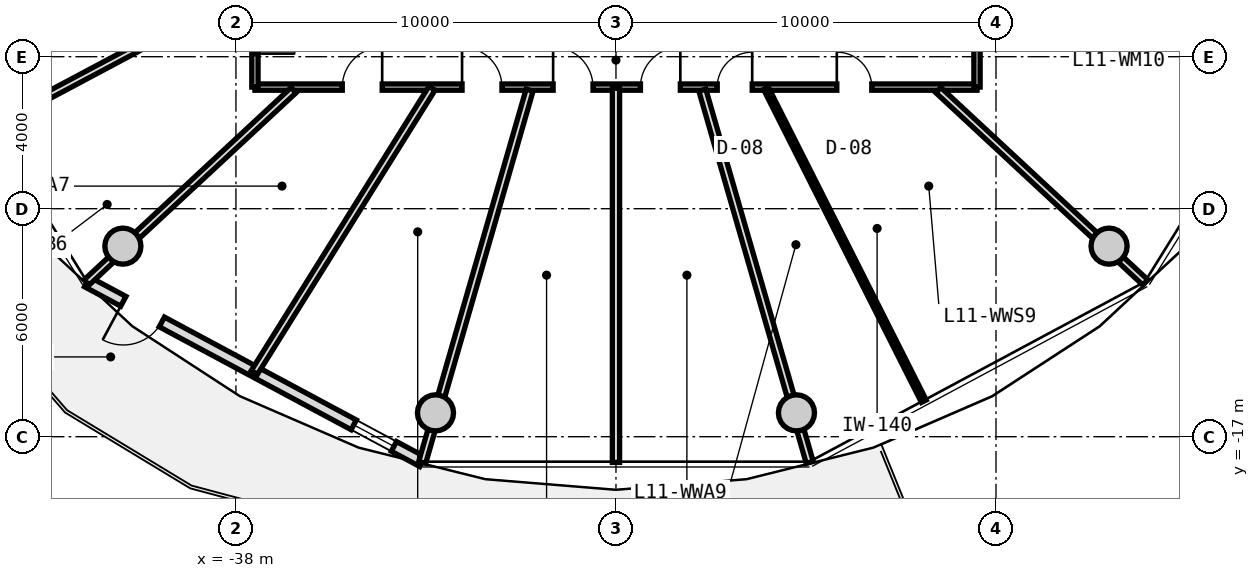
"""IFC4 building model, lengths in metres.
Left out: names, types, materials, properties, quantities, classifications, styles, units other than length and angle.
Written with IfcOpenShell. Run it as: python <this file> out.ifc"""

import sys

from ifc_helpers import new_model, si_unit, direction, frame, frame_2d, origin, origin_2d, place, context, subcontext, project, spatial, rectangle, circle, extrude, source, transform, mapped, element, fill, save


model = new_model("IFC4")
c1 = context("Model", 3, precision=1e-05, world=origin(), true_north=direction((0.0, 1.0)))
c2 = subcontext(c1, "Body", "Model", "MODEL_VIEW")
j1 = project(units=[si_unit("LENGTHUNIT", "METRE"), si_unit("PLANEANGLEUNIT", "RADIAN")], contexts=[c1])
p1 = place(None, origin())
s1 = spatial("IfcSite", under=j1, at=p1, CompositionType="ELEMENT")
p2 = place(p1, origin())
s2 = spatial("IfcBuilding", under=s1, at=p2, CompositionType="ELEMENT")
p3 = place(p2, frame((0.0, 0.0, 39.9)))
s3 = spatial("IfcBuildingStorey", under=s2, at=p3, CompositionType="ELEMENT", Elevation=39.9)
m1 = source(origin(), c2, "Body", "SweptSolid", [
    extrude(circle(Radius=0.475, at=origin_2d()), origin(), (0.0, 0.0, 1.0), 3.05),
])
for number, where, z_axis, x_axis in (
    (1, (-40.975, -11.985, 0.0), (0.0, 0.0, 1.0), (1.0, 0.0, 0.0)),
    (2, (-32.749, -16.373, 0.0), (0.0, 0.0, 1.0), (1.0, 0.0, 0.0)),
    (3, (-23.251, -16.373, 0.0), (0.0, 0.0, 1.0), (1.0, 0.0, 0.0)),
    (4, (-15.025, -11.985, 0.0), (0.0, 0.0, 1.0), (1.0, 0.0, 0.0)),
):
    element("IfcColumn", number, at=place(p3, frame(where, z_axis=z_axis, x_axis=x_axis)), inside=s3, PredefinedType="COLUMN", context=c2, shape_type="MappedRepresentation", body=[
        mapped(m1, transform((0.0, 0.0, 0.0), x_axis=(1.0, 0.0, 0.0), y_axis=(0.0, 1.0, 0.0), z_axis=(0.0, 0.0, 1.0), scale=1.0)),
    ])
m2 = source(origin(), c2, "Body", "SweptSolid", [
    extrude(rectangle(XDim=10.011, YDim=0.29, at=frame_2d((5.005, 0.0))), origin(), (0.0, 0.0, 1.0), 2.79),
])
p4 = place(p3, frame((-33.094, -17.657, 0.0), z_axis=(0.0, 0.0, 1.0), x_axis=(-0.881272505317, 0.472608475773, 0.0)))
e5 = element("IfcWall", 5, at=p4, inside=s3, PredefinedType="SOLIDWALL", context=c2, shape_type="MappedRepresentation", body=[
    mapped(m2, transform((0.0, 0.0, 0.0), x_axis=(1.0, 0.0, 0.0), y_axis=(0.0, 1.0, 0.0), z_axis=(0.0, 0.0, 1.0), scale=1.0)),
])
p5 = place(p4, frame((7.78, 0.0, 0.0)))
e6 = element("IfcOpeningElement", 6, at=p5, cuts=e5, PredefinedType="OPENING", context=c2, shape_type="SweptSolid", body=[
    extrude(rectangle(XDim=1.15, YDim=2.25, at=frame_2d((0.575, 1.125))), frame((0.0, 0.155, 0.0), z_axis=(0.0, -1.0, 0.0), x_axis=(1.0, 0.0, 0.0)), (0.0, 0.0, 1.0), 0.31),
])
p6 = place(p4, frame((0.85, 0.0, 0.85)))
e7 = element("IfcOpeningElement", 7, at=p6, cuts=e5, PredefinedType="OPENING", context=c2, shape_type="SweptSolid", body=[
    extrude(rectangle(XDim=1.2, YDim=1.5, at=frame_2d((0.6, 0.75))), frame((0.0, 0.155, 0.0), z_axis=(0.0, -1.0, 0.0), x_axis=(1.0, 0.0, 0.0)), (0.0, 0.0, 1.0), 0.31),
])
m3 = source(origin(), c2, "Body", "SweptSolid", [
    extrude(rectangle(XDim=19.0, YDim=0.165, at=frame_2d((9.5, 0.0))), origin(), (0.0, 0.0, 1.0), 2.775),
])
p7 = place(p3, frame((-18.5, -7.8, 0.0), z_axis=(0.0, 0.0, 1.0), x_axis=(-1.0, 0.0, 0.0)))
e8 = element("IfcWall", 8, at=p7, inside=s3, PredefinedType="PARTITIONING", context=c2, shape_type="MappedRepresentation", body=[
    mapped(m3, transform((0.0, 0.0, 0.0), x_axis=(1.0, 0.0, 0.0), y_axis=(0.0, 1.0, 0.0), z_axis=(0.0, 0.0, 1.0), scale=1.0)),
])
p8 = place(p7, frame((15.652, 0.0, 0.0)))
e9 = element("IfcOpeningElement", 9, at=p8, cuts=e8, PredefinedType="OPENING", context=c2, shape_type="SweptSolid", body=[
    extrude(rectangle(XDim=1.05, YDim=2.15, at=frame_2d((0.525, 1.075))), frame((0.0, 0.093, 0.0), z_axis=(0.0, -1.0, 0.0), x_axis=(1.0, 0.0, 0.0)), (0.0, 0.0, 1.0), 0.185),
])
p9 = place(p7, frame((12.5, 0.0, 0.0)))
e10 = element("IfcOpeningElement", 10, at=p9, cuts=e8, PredefinedType="OPENING", context=c2, shape_type="SweptSolid", body=[
    extrude(rectangle(XDim=1.05, YDim=2.15, at=frame_2d((0.525, 1.075))), frame((0.0, 0.093, 0.0), z_axis=(0.0, -1.0, 0.0), x_axis=(1.0, 0.0, 0.0)), (0.0, 0.0, 1.0), 0.185),
])
p10 = place(p7, frame((10.104, 0.0, 0.0)))
e11 = element("IfcOpeningElement", 11, at=p10, cuts=e8, PredefinedType="OPENING", context=c2, shape_type="SweptSolid", body=[
    extrude(rectangle(XDim=1.05, YDim=2.15, at=frame_2d((0.525, 1.075))), frame((0.0, 0.093, 0.0), z_axis=(0.0, -1.0, 0.0), x_axis=(1.0, 0.0, 0.0)), (0.0, 0.0, 1.0), 0.185),
])
p11 = place(p7, frame((7.806, 0.0, 0.0)))
e12 = element("IfcOpeningElement", 12, at=p11, cuts=e8, PredefinedType="OPENING", context=c2, shape_type="SweptSolid", body=[
    extrude(rectangle(XDim=1.05, YDim=2.15, at=frame_2d((0.525, 1.075))), frame((0.0, 0.093, 0.0), z_axis=(0.0, -1.0, 0.0), x_axis=(1.0, 0.0, 0.0)), (0.0, 0.0, 1.0), 0.185),
])
p12 = place(p7, frame((5.915, 0.0, 0.0)))
e13 = element("IfcOpeningElement", 13, at=p12, cuts=e8, PredefinedType="OPENING", context=c2, shape_type="SweptSolid", body=[
    extrude(rectangle(XDim=0.92, YDim=2.1, at=frame_2d((0.46, 1.05))), frame((0.0, 0.093, 0.0), z_axis=(0.0, -1.0, 0.0), x_axis=(1.0, 0.0, 0.0)), (0.0, 0.0, 1.0), 0.185),
])
p13 = place(p7, frame((2.769, 0.0, 0.0)))
e14 = element("IfcOpeningElement", 14, at=p13, cuts=e8, PredefinedType="OPENING", context=c2, shape_type="SweptSolid", body=[
    extrude(rectangle(XDim=0.92, YDim=2.1, at=frame_2d((0.46, 1.05))), frame((0.0, 0.093, 0.0), z_axis=(0.0, -1.0, 0.0), x_axis=(1.0, 0.0, 0.0)), (0.0, 0.0, 1.0), 0.185),
])
m4 = source(origin(), c2, "Body", "SweptSolid", [
    extrude(rectangle(XDim=15.6, YDim=0.165, at=frame_2d((7.8, 0.0))), origin(), (0.0, 0.0, 1.0), 2.775),
])
p14 = place(p3, frame((-37.5, -7.8, 0.0), z_axis=(0.0, 0.0, 1.0), x_axis=(0.0, 1.0, 0.0)))
e15 = element("IfcWall", 15, at=p14, inside=s3, PredefinedType="PARTITIONING", context=c2, shape_type="MappedRepresentation", body=[
    mapped(m4, transform((0.0, 0.0, 0.0), x_axis=(1.0, 0.0, 0.0), y_axis=(0.0, 1.0, 0.0), z_axis=(0.0, 0.0, 1.0), scale=1.0)),
])
p15 = place(p14, frame((13.293, 0.0, 0.0)))
e16 = element("IfcOpeningElement", 16, at=p15, cuts=e15, PredefinedType="OPENING", context=c2, shape_type="SweptSolid", body=[
    extrude(rectangle(XDim=1.05, YDim=2.15, at=frame_2d((0.525, 1.075))), frame((0.0, 0.093, 0.0), z_axis=(0.0, -1.0, 0.0), x_axis=(1.0, 0.0, 0.0)), (0.0, 0.0, 1.0), 0.185),
])
p16 = place(p14, frame((11.018, 0.0, 0.0)))
e17 = element("IfcOpeningElement", 17, at=p16, cuts=e15, PredefinedType="OPENING", context=c2, shape_type="SweptSolid", body=[
    extrude(rectangle(XDim=1.05, YDim=2.15, at=frame_2d((0.525, 1.075))), frame((0.0, 0.093, 0.0), z_axis=(0.0, -1.0, 0.0), x_axis=(1.0, 0.0, 0.0)), (0.0, 0.0, 1.0), 0.185),
])
p17 = place(p14, frame((7.812, 0.0, 0.0)))
e18 = element("IfcOpeningElement", 18, at=p17, cuts=e15, PredefinedType="OPENING", context=c2, shape_type="SweptSolid", body=[
    extrude(rectangle(XDim=1.05, YDim=2.15, at=frame_2d((0.525, 1.075))), frame((0.0, 0.093, 0.0), z_axis=(0.0, -1.0, 0.0), x_axis=(1.0, 0.0, 0.0)), (0.0, 0.0, 1.0), 0.185),
])
p18 = place(p14, frame((6.035, 0.0, 0.0)))
e19 = element("IfcOpeningElement", 19, at=p18, cuts=e15, PredefinedType="OPENING", context=c2, shape_type="SweptSolid", body=[
    extrude(rectangle(XDim=1.05, YDim=2.15, at=frame_2d((0.525, 1.075))), frame((0.0, 0.093, 0.0), z_axis=(0.0, -1.0, 0.0), x_axis=(1.0, 0.0, 0.0)), (0.0, 0.0, 1.0), 0.185),
])
p19 = place(p14, frame((3.489, 0.0, 0.0)))
e20 = element("IfcOpeningElement", 20, at=p19, cuts=e15, PredefinedType="OPENING", context=c2, shape_type="SweptSolid", body=[
    extrude(rectangle(XDim=1.05, YDim=2.15, at=frame_2d((0.525, 1.075))), frame((0.0, 0.093, 0.0), z_axis=(0.0, -1.0, 0.0), x_axis=(1.0, 0.0, 0.0)), (0.0, 0.0, 1.0), 0.185),
])
p20 = place(p14, frame((0.882, 0.0, 0.0)))
e21 = element("IfcOpeningElement", 21, at=p20, cuts=e15, PredefinedType="OPENING", context=c2, shape_type="SweptSolid", body=[
    extrude(rectangle(XDim=1.05, YDim=2.15, at=frame_2d((0.525, 1.075))), frame((0.0, 0.093, 0.0), z_axis=(0.0, -1.0, 0.0), x_axis=(1.0, 0.0, 0.0)), (0.0, 0.0, 1.0), 0.185),
])
p21 = place(p3, frame((-18.5, 7.8, 0.0), z_axis=(0.0, 0.0, 1.0), x_axis=(0.0, -1.0, 0.0)))
e22 = element("IfcWall", 22, at=p21, inside=s3, PredefinedType="PARTITIONING", context=c2, shape_type="MappedRepresentation", body=[
    mapped(m4, transform((0.0, 0.0, 0.0), x_axis=(1.0, 0.0, 0.0), y_axis=(0.0, 1.0, 0.0), z_axis=(0.0, 0.0, 1.0), scale=1.0)),
])
p22 = place(p21, frame((12.141, 0.0, 0.0)))
e23 = element("IfcOpeningElement", 23, at=p22, cuts=e22, PredefinedType="OPENING", context=c2, shape_type="SweptSolid", body=[
    extrude(rectangle(XDim=1.25, YDim=2.2, at=frame_2d((0.625, 1.1))), frame((0.0, 0.093, 0.0), z_axis=(0.0, -1.0, 0.0), x_axis=(1.0, 0.0, 0.0)), (0.0, 0.0, 1.0), 0.185),
])
p23 = place(p21, frame((7.175, 0.0, 0.0)))
e24 = element("IfcOpeningElement", 24, at=p23, cuts=e22, PredefinedType="OPENING", context=c2, shape_type="SweptSolid", body=[
    extrude(rectangle(XDim=1.25, YDim=2.2, at=frame_2d((0.625, 1.1))), frame((0.0, 0.093, 0.0), z_axis=(0.0, -1.0, 0.0), x_axis=(1.0, 0.0, 0.0)), (0.0, 0.0, 1.0), 0.185),
])
p24 = place(p21, frame((2.826, 0.0, 0.0)))
e25 = element("IfcOpeningElement", 25, at=p24, cuts=e22, PredefinedType="OPENING", context=c2, shape_type="SweptSolid", body=[
    extrude(rectangle(XDim=1.05, YDim=2.15, at=frame_2d((0.525, 1.075))), frame((0.0, 0.093, 0.0), z_axis=(0.0, -1.0, 0.0), x_axis=(1.0, 0.0, 0.0)), (0.0, 0.0, 1.0), 0.185),
])
p25 = place(p21, frame((0.881, 0.0, 0.0)))
e26 = element("IfcOpeningElement", 26, at=p25, cuts=e22, PredefinedType="OPENING", context=c2, shape_type="SweptSolid", body=[
    extrude(rectangle(XDim=1.05, YDim=2.15, at=frame_2d((0.525, 1.075))), frame((0.0, 0.093, 0.0), z_axis=(0.0, -1.0, 0.0), x_axis=(1.0, 0.0, 0.0)), (0.0, 0.0, 1.0), 0.185),
])
m5 = source(origin(), c2, "Body", "SweptSolid", [
    extrude(rectangle(XDim=7.435, YDim=0.19, at=frame_2d((3.717, 0.0))), origin(), (0.0, 0.0, 1.0), 2.225),
])
p26 = place(p3, frame((-36.483, -7.88, 0.0), z_axis=(0.0, 0.0, 1.0), x_axis=(-0.732651956848, -0.680603489652, 0.0)))
e27 = element("IfcWall", 27, at=p26, inside=s3, PredefinedType="PARTITIONING", context=c2, shape_type="MappedRepresentation", body=[
    mapped(m5, transform((0.0, 0.0, 0.0), x_axis=(1.0, 0.0, 0.0), y_axis=(0.0, 1.0, 0.0), z_axis=(0.0, 0.0, 1.0), scale=1.0)),
])
m6 = source(origin(), c2, "Body", "SweptSolid", [
    extrude(rectangle(XDim=7.873, YDim=0.19, at=frame_2d((3.937, 0.0))), origin(), (0.0, 0.0, 1.0), 2.775),
])
p27 = place(p3, frame((-37.53, -5.138, 0.0), z_axis=(0.0, 0.0, 1.0), x_axis=(-0.882666052726, -0.470000680175, 0.0)))
e28 = element("IfcWall", 28, at=p27, inside=s3, PredefinedType="PARTITIONING", context=c2, shape_type="MappedRepresentation", body=[
    mapped(m6, transform((0.0, 0.0, 0.0), x_axis=(1.0, 0.0, 0.0), y_axis=(0.0, 1.0, 0.0), z_axis=(0.0, 0.0, 1.0), scale=1.0)),
])
m7 = source(origin(), c2, "Body", "SweptSolid", [
    extrude(rectangle(XDim=10.196, YDim=0.19, at=frame_2d((5.098, 0.0))), origin(), (0.0, 0.0, 1.0), 2.225),
])
p28 = place(p3, frame((-30.273, -7.88, 0.0), z_axis=(0.0, 0.0, 1.0), x_axis=(-0.277136420347, -0.960830580549, 0.0)))
e29 = element("IfcWall", 29, at=p28, inside=s3, PredefinedType="PARTITIONING", context=c2, shape_type="MappedRepresentation", body=[
    mapped(m7, transform((0.0, 0.0, 0.0), x_axis=(1.0, 0.0, 0.0), y_axis=(0.0, 1.0, 0.0), z_axis=(0.0, 0.0, 1.0), scale=1.0)),
])
m8 = source(origin(), c2, "Body", "SweptSolid", [
    extrude(rectangle(XDim=8.818, YDim=0.19, at=frame_2d((4.409, 0.0))), origin(), (0.0, 0.0, 1.0), 2.775),
])
p29 = place(p3, frame((-32.841, -7.83, 0.0), z_axis=(0.0, 0.0, 1.0), x_axis=(-0.529931746109, -0.848040296487, 0.0)))
e30 = element("IfcWall", 30, at=p29, inside=s3, PredefinedType="PARTITIONING", context=c2, shape_type="MappedRepresentation", body=[
    mapped(m8, transform((0.0, 0.0, 0.0), x_axis=(1.0, 0.0, 0.0), y_axis=(0.0, 1.0, 0.0), z_axis=(0.0, 0.0, 1.0), scale=1.0)),
])
p30 = place(p3, frame((-25.727, -7.88, 0.0), z_axis=(0.0, 0.0, 1.0), x_axis=(0.277136420347, -0.960830580549, 0.0)))
e31 = element("IfcWall", 31, at=p30, inside=s3, PredefinedType="PARTITIONING", context=c2, shape_type="MappedRepresentation", body=[
    mapped(m7, transform((0.0, 0.0, 0.0), x_axis=(1.0, 0.0, 0.0), y_axis=(0.0, 1.0, 0.0), z_axis=(0.0, 0.0, 1.0), scale=1.0)),
])
m9 = source(origin(), c2, "Body", "SweptSolid", [
    extrude(rectangle(XDim=9.846, YDim=0.19, at=frame_2d((4.923, 0.0))), origin(), (0.0, 0.0, 1.0), 2.775),
])
p31 = place(p3, frame((-28.0, -7.83, 0.0), z_axis=(0.0, 0.0, 1.0), x_axis=(0.0, -1.0, 0.0)))
e32 = element("IfcWall", 32, at=p31, inside=s3, PredefinedType="PARTITIONING", context=c2, shape_type="MappedRepresentation", body=[
    mapped(m9, transform((0.0, 0.0, 0.0), x_axis=(1.0, 0.0, 0.0), y_axis=(0.0, 1.0, 0.0), z_axis=(0.0, 0.0, 1.0), scale=1.0)),
])
p32 = place(p3, frame((-19.517, -7.88, 0.0), z_axis=(0.0, 0.0, 1.0), x_axis=(0.732651956848, -0.680603489652, 0.0)))
e33 = element("IfcWall", 33, at=p32, inside=s3, PredefinedType="PARTITIONING", context=c2, shape_type="MappedRepresentation", body=[
    mapped(m5, transform((0.0, 0.0, 0.0), x_axis=(1.0, 0.0, 0.0), y_axis=(0.0, 1.0, 0.0), z_axis=(0.0, 0.0, 1.0), scale=1.0)),
])
m10 = source(origin(), c2, "Body", "SweptSolid", [
    extrude(rectangle(XDim=9.225, YDim=0.14, at=frame_2d((4.613, 0.0))), origin(), (0.0, 0.0, 1.0), 2.775),
])
p33 = place(p3, frame((-24.054, -7.83, 0.0), z_axis=(0.0, 0.0, 1.0), x_axis=(0.450460543767, -0.892796336523, 0.0)))
e34 = element("IfcWall", 34, at=p33, inside=s3, PredefinedType="PARTITIONING", context=c2, shape_type="MappedRepresentation", body=[
    mapped(m10, transform((0.0, 0.0, 0.0), x_axis=(1.0, 0.0, 0.0), y_axis=(0.0, 1.0, 0.0), z_axis=(0.0, 0.0, 1.0), scale=1.0)),
])
m11 = source(origin(), c2, "Body", "SweptSolid", [
    extrude(rectangle(XDim=1.15, YDim=2.25, at=frame_2d((0.575, 1.125))), frame((0.0, 0.025, 0.0), z_axis=(0.0, -1.0, 0.0), x_axis=(1.0, 0.0, 0.0)), (0.0, 0.0, 1.0), 0.05),
])
p34 = place(p5, origin())
e35 = element("IfcDoor", 35, at=p34, inside=s3, OperationType="SINGLE_SWING_RIGHT", PredefinedType="DOOR", context=c2, shape_type="MappedRepresentation", body=[
    mapped(m11, transform((0.0, 0.0, 0.0), x_axis=(1.0, 0.0, 0.0), y_axis=(0.0, 1.0, 0.0), z_axis=(0.0, 0.0, 1.0), scale=1.0)),
])
fill(e6, e35)
m12 = source(origin(), c2, "Body", "SweptSolid", [
    extrude(rectangle(XDim=1.2, YDim=1.5, at=frame_2d((0.6, 0.75))), frame((0.0, 0.03, 0.0), z_axis=(0.0, -1.0, 0.0), x_axis=(1.0, 0.0, 0.0)), (0.0, 0.0, 1.0), 0.06),
])
p35 = place(p6, origin())
e36 = element("IfcWindow", 36, at=p35, inside=s3, PartitioningType="SINGLE_PANEL", PredefinedType="WINDOW", context=c2, shape_type="MappedRepresentation", body=[
    mapped(m12, transform((0.0, 0.0, 0.0), x_axis=(1.0, 0.0, 0.0), y_axis=(0.0, 1.0, 0.0), z_axis=(0.0, 0.0, 1.0), scale=1.0)),
])
fill(e7, e36)
m13 = source(origin(), c2, "Body", "SweptSolid", [
    extrude(rectangle(XDim=1.05, YDim=2.15, at=frame_2d((0.525, 1.075))), frame((0.0, 0.025, 0.0), z_axis=(0.0, -1.0, 0.0), x_axis=(1.0, 0.0, 0.0)), (0.0, 0.0, 1.0), 0.05),
])
p36 = place(p20, frame((1.05, 0.0, 0.0), z_axis=(0.0, 0.0, 1.0), x_axis=(-1.0, 0.0, 0.0)))
e37 = element("IfcDoor", 37, at=p36, inside=s3, OperationType="SINGLE_SWING_RIGHT", PredefinedType="DOOR", context=c2, shape_type="MappedRepresentation", body=[
    mapped(m13, transform((0.0, 0.0, 0.0), x_axis=(1.0, 0.0, 0.0), y_axis=(0.0, 1.0, 0.0), z_axis=(0.0, 0.0, 1.0), scale=1.0)),
])
fill(e21, e37)
p37 = place(p8, frame((1.05, 0.0, 0.0), z_axis=(0.0, 0.0, 1.0), x_axis=(-1.0, 0.0, 0.0)))
e38 = element("IfcDoor", 38, at=p37, inside=s3, OperationType="SINGLE_SWING_RIGHT", PredefinedType="DOOR", context=c2, shape_type="MappedRepresentation", body=[
    mapped(m13, transform((0.0, 0.0, 0.0), x_axis=(1.0, 0.0, 0.0), y_axis=(0.0, 1.0, 0.0), z_axis=(0.0, 0.0, 1.0), scale=1.0)),
])
fill(e9, e38)
p38 = place(p9, frame((1.05, 0.0, 0.0), z_axis=(0.0, 0.0, 1.0), x_axis=(-1.0, 0.0, 0.0)))
e39 = element("IfcDoor", 39, at=p38, inside=s3, OperationType="SINGLE_SWING_LEFT", PredefinedType="DOOR", context=c2, shape_type="MappedRepresentation", body=[
    mapped(m13, transform((0.0, 0.0, 0.0), x_axis=(1.0, 0.0, 0.0), y_axis=(0.0, 1.0, 0.0), z_axis=(0.0, 0.0, 1.0), scale=1.0)),
])
fill(e10, e39)
p39 = place(p10, frame((1.05, 0.0, 0.0), z_axis=(0.0, 0.0, 1.0), x_axis=(-1.0, 0.0, 0.0)))
e40 = element("IfcDoor", 40, at=p39, inside=s3, OperationType="SINGLE_SWING_LEFT", PredefinedType="DOOR", context=c2, shape_type="MappedRepresentation", body=[
    mapped(m13, transform((0.0, 0.0, 0.0), x_axis=(1.0, 0.0, 0.0), y_axis=(0.0, 1.0, 0.0), z_axis=(0.0, 0.0, 1.0), scale=1.0)),
])
fill(e11, e40)
p40 = place(p11, frame((1.05, 0.0, 0.0), z_axis=(0.0, 0.0, 1.0), x_axis=(-1.0, 0.0, 0.0)))
e41 = element("IfcDoor", 41, at=p40, inside=s3, OperationType="SINGLE_SWING_RIGHT", PredefinedType="DOOR", context=c2, shape_type="MappedRepresentation", body=[
    mapped(m13, transform((0.0, 0.0, 0.0), x_axis=(1.0, 0.0, 0.0), y_axis=(0.0, 1.0, 0.0), z_axis=(0.0, 0.0, 1.0), scale=1.0)),
])
fill(e12, e41)
m14 = source(origin(), c2, "Body", "SweptSolid", [
    extrude(rectangle(XDim=0.92, YDim=2.1, at=frame_2d((0.46, 1.05))), frame((0.0, 0.025, 0.0), z_axis=(0.0, -1.0, 0.0), x_axis=(1.0, 0.0, 0.0)), (0.0, 0.0, 1.0), 0.05),
])
p41 = place(p12, frame((0.92, 0.0, 0.0), z_axis=(0.0, 0.0, 1.0), x_axis=(-1.0, 0.0, 0.0)))
e42 = element("IfcDoor", 42, at=p41, inside=s3, OperationType="SINGLE_SWING_RIGHT", PredefinedType="DOOR", context=c2, shape_type="MappedRepresentation", body=[
    mapped(m14, transform((0.0, 0.0, 0.0), x_axis=(1.0, 0.0, 0.0), y_axis=(0.0, 1.0, 0.0), z_axis=(0.0, 0.0, 1.0), scale=1.0)),
])
fill(e13, e42)
p42 = place(p13, frame((0.92, 0.0, 0.0), z_axis=(0.0, 0.0, 1.0), x_axis=(-1.0, 0.0, 0.0)))
e43 = element("IfcDoor", 43, at=p42, inside=s3, OperationType="SINGLE_SWING_LEFT", PredefinedType="DOOR", context=c2, shape_type="MappedRepresentation", body=[
    mapped(m14, transform((0.0, 0.0, 0.0), x_axis=(1.0, 0.0, 0.0), y_axis=(0.0, 1.0, 0.0), z_axis=(0.0, 0.0, 1.0), scale=1.0)),
])
fill(e14, e43)
save(model, sys.argv[1])
